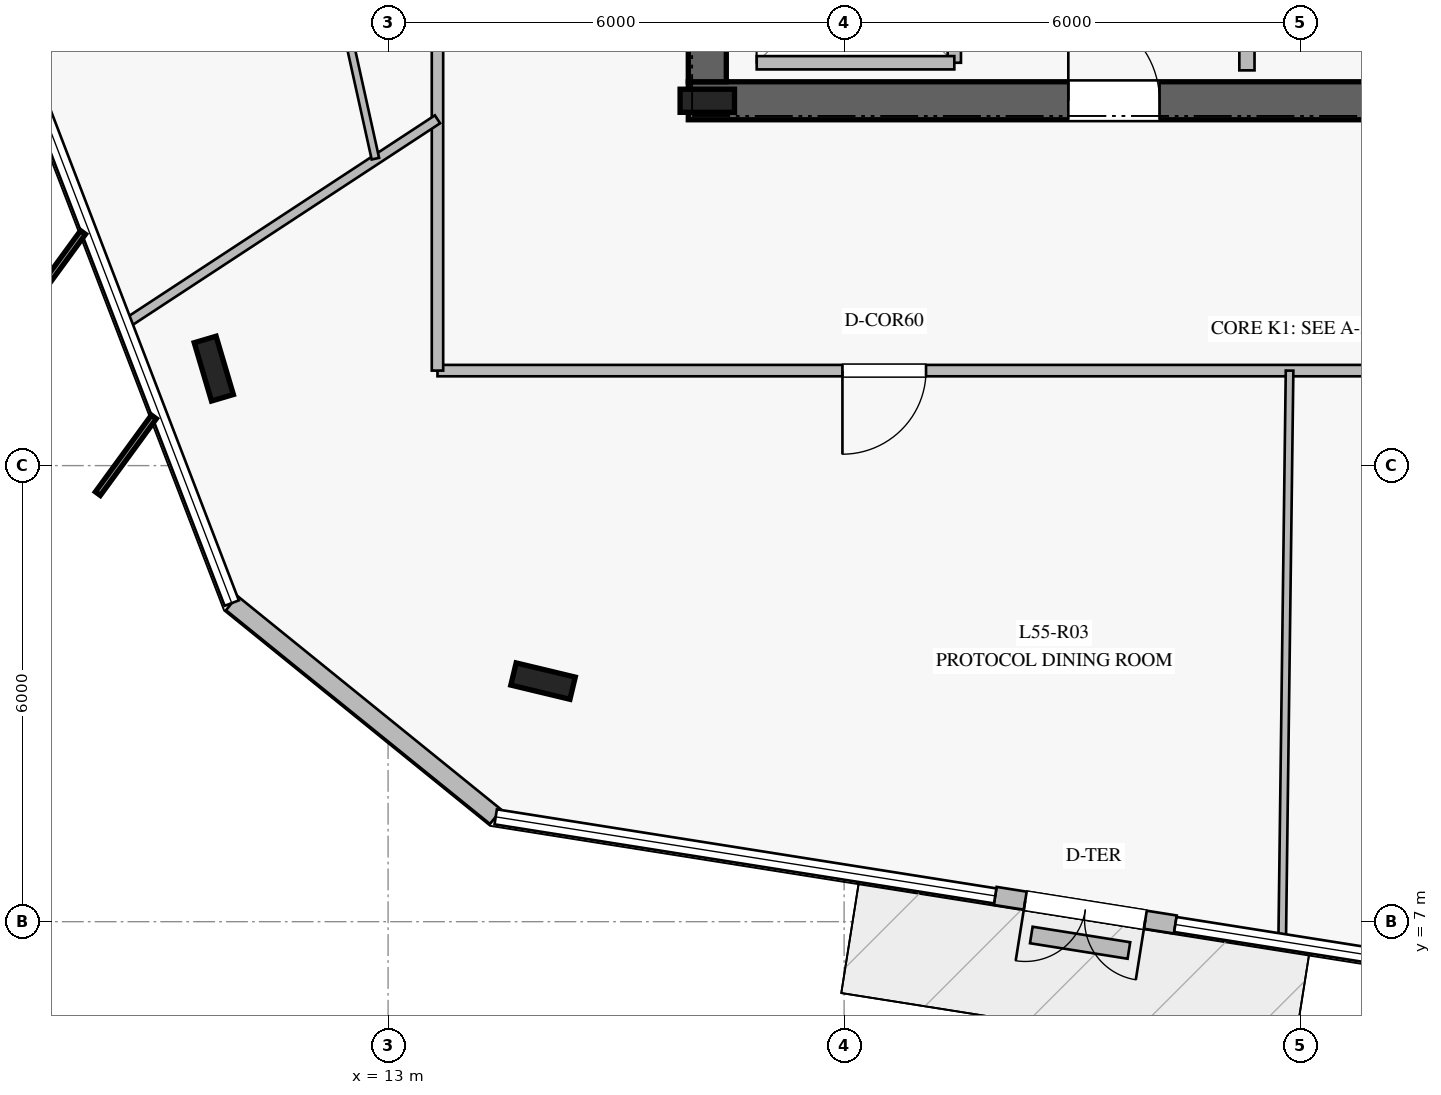
"""IFC4 building model, lengths in metres.
Left out: names, types, materials, properties, quantities, classifications, styles, units other than length and angle.
Written with IfcOpenShell. Run it as: python <this file> out.ifc"""

import sys

from ifc_helpers import new_model, si_unit, direction, frame, frame_2d, origin, origin_2d, place, context, subcontext, project, spatial, rectangle, i_section, extrude, element, fill, save


model = new_model("IFC4")
c1 = context("Model", 3, precision=1e-05, world=origin(), true_north=direction((0.0, 1.0)))
c2 = subcontext(c1, "Body", "Model", "MODEL_VIEW")
j1 = project(units=[si_unit("LENGTHUNIT", "METRE"), si_unit("PLANEANGLEUNIT", "RADIAN")], contexts=[c1])
p1 = place(None, origin())
s1 = spatial("IfcSite", under=j1, at=p1, CompositionType="ELEMENT")
p2 = place(p1, origin())
s2 = spatial("IfcBuilding", under=s1, at=p2, CompositionType="ELEMENT")
p3 = place(p2, frame((0.0, 0.0, 228.8)))
s3 = spatial("IfcBuildingStorey", under=s2, at=p3, CompositionType="ELEMENT", Elevation=228.8)
p4 = place(p3, frame((16.95, 17.8, 0.0), z_axis=(0.0, 0.0, 1.0), x_axis=(1.0, 0.0, 0.0)))
e1 = element("IfcWall", 1, at=p4, inside=s3, PredefinedType="SHEAR", context=c2, shape_type="SweptSolid", body=[
    extrude(rectangle(XDim=16.1, YDim=0.5, at=frame_2d((8.05, 0.0))), origin(), (0.0, 0.0, 1.0), 3.78),
])
p5 = place(p4, frame((5.0, 0.0, 0.0)))
e2 = element("IfcOpeningElement", 2, at=p5, cuts=e1, PredefinedType="OPENING", context=c2, shape_type="SweptSolid", body=[
    extrude(rectangle(XDim=1.2, YDim=2.25, at=frame_2d((0.6, 1.125))), frame((0.0, 0.26, 0.0), z_axis=(0.0, -1.0, 0.0), x_axis=(1.0, 0.0, 0.0)), (0.0, 0.0, 1.0), 0.52),
])
p6 = place(p4, frame((13.95, 0.0, 0.0)))
e3 = element("IfcOpeningElement", 3, at=p6, cuts=e1, PredefinedType="OPENING", context=c2, shape_type="SweptSolid", body=[
    extrude(rectangle(XDim=0.9, YDim=2.1, at=frame_2d((0.45, 1.05))), frame((0.0, 0.26, 0.0), z_axis=(0.0, -1.0, 0.0), x_axis=(1.0, 0.0, 0.0)), (0.0, 0.0, 1.0), 0.52),
])
p7 = place(p4, frame((9.2, 0.0, 0.0)))
e4 = element("IfcOpeningElement", 4, at=p7, cuts=e1, PredefinedType="OPENING", context=c2, shape_type="SweptSolid", body=[
    extrude(rectangle(XDim=1.1, YDim=2.2, at=frame_2d((0.55, 1.1))), frame((0.0, 0.26, 0.0), z_axis=(0.0, -1.0, 0.0), x_axis=(1.0, 0.0, 0.0)), (0.0, 0.0, 1.0), 0.52),
])
p8 = place(p3, frame((17.2, 31.95, 0.0), z_axis=(0.0, 0.0, 1.0), x_axis=(0.0, -1.0, 0.0)))
e5 = element("IfcWall", 5, at=p8, inside=s3, PredefinedType="SHEAR", context=c2, shape_type="SweptSolid", body=[
    extrude(rectangle(XDim=13.9, YDim=0.5, at=frame_2d((6.95, 0.0))), origin(), (0.0, 0.0, 1.0), 3.78),
])
p9 = place(p8, frame((2.1, 0.0, 0.0)))
e6 = element("IfcOpeningElement", 6, at=p9, cuts=e5, PredefinedType="OPENING", context=c2, shape_type="SweptSolid", body=[
    extrude(rectangle(XDim=1.5, YDim=2.2, at=frame_2d((0.75, 1.1))), frame((0.0, 0.26, 0.0), z_axis=(0.0, -1.0, 0.0), x_axis=(1.0, 0.0, 0.0)), (0.0, 0.0, 1.0), 0.52),
])
p10 = place(p3, frame((17.2, 17.8, 0.0), z_axis=(0.0, 0.0, 1.0), x_axis=(1.0, 0.0, 0.0)))
e7 = element("IfcColumn", 7, at=p10, inside=s3, PredefinedType="COLUMN", context=c2, shape_type="SweptSolid", body=[
    extrude(i_section(OverallWidth=0.304, OverallDepth=0.716, WebThickness=0.021, FlangeThickness=0.04, at=origin_2d()), origin(), (0.0, 0.0, 1.0), 4.0),
])
for number, where, z_axis, x_axis in (
    (8, (10.707, 14.276, 0.0), (0.0, 0.0, 1.0), (-0.284, 0.959, 0.0)),
    (9, (15.039, 10.165, 0.0), (0.0, 0.0, 1.0), (-0.972, 0.233, 0.0)),
):
    element("IfcColumn", number, at=place(p3, frame(where, z_axis=z_axis, x_axis=x_axis)), inside=s3, PredefinedType="COLUMN", context=c2, shape_type="SweptSolid", body=[
        extrude(i_section(OverallWidth=0.3, OverallDepth=0.8, WebThickness=0.018, FlangeThickness=0.033, at=origin_2d()), origin(), (0.0, 0.0, 1.0), 4.0),
    ])
p11 = place(p3, frame((10.943, 11.191, 0.0), z_axis=(0.0, 0.0, 1.0), x_axis=(0.777177433654, -0.629281524136, 0.0)))
e10 = element("IfcWall", 10, at=p11, inside=s3, PredefinedType="STANDARD", context=c2, shape_type="SweptSolid", body=[
    extrude(rectangle(XDim=4.469, YDim=0.24, at=frame_2d((2.234, 0.0))), origin(), (0.0, 0.0, 1.0), 3.78),
])
p12 = place(p3, frame((20.988, 7.339, 0.0), z_axis=(0.0, 0.0, 1.0), x_axis=(0.987632277634, -0.156788023059, 0.0)))
e11 = element("IfcWall", 11, at=p12, inside=s3, PredefinedType="STANDARD", context=c2, shape_type="SweptSolid", body=[
    extrude(rectangle(XDim=2.4, YDim=0.24, at=frame_2d((1.2, 0.0))), origin(), (0.0, 0.0, 1.0), 3.78),
])
p13 = place(p12, frame((0.4, 0.0, 0.0)))
e12 = element("IfcOpeningElement", 12, at=p13, cuts=e11, PredefinedType="OPENING", context=c2, shape_type="SweptSolid", body=[
    extrude(rectangle(XDim=1.6, YDim=2.25, at=frame_2d((0.8, 1.125))), frame((0.0, 0.13, 0.0), z_axis=(0.0, -1.0, 0.0), x_axis=(1.0, 0.0, 0.0)), (0.0, 0.0, 1.0), 0.26),
])
p14 = place(p3, frame((21.463, 6.825, 0.0), z_axis=(0.0, 0.0, 1.0), x_axis=(0.98763322112, -0.156782079779, 0.0)))
e13 = element("IfcWall", 13, at=p14, inside=s3, PredefinedType="USERDEFINED", context=c2, shape_type="SweptSolid", body=[
    extrude(rectangle(XDim=1.3, YDim=0.22, at=frame_2d((0.65, 0.0))), origin(), (0.0, 0.0, 1.0), 0.4),
])
p15 = place(p3, frame((24.3, 18.2, 0.0), z_axis=(0.0, 0.0, 1.0), x_axis=(0.0, 1.0, 0.0)))
e14 = element("IfcWall", 14, at=p15, inside=s3, PredefinedType="PARTITIONING", context=c2, shape_type="SweptSolid", body=[
    extrude(rectangle(XDim=5.15, YDim=0.2, at=frame_2d((2.575, 0.0))), origin(), (0.0, 0.0, 1.0), 3.78),
])
p16 = place(p3, frame((20.45, 18.3, 0.0), z_axis=(0.0, 0.0, 1.0), x_axis=(0.0, 1.0, 0.0)))
e15 = element("IfcWall", 15, at=p16, inside=s3, PredefinedType="PARTITIONING", context=c2, shape_type="SweptSolid", body=[
    extrude(rectangle(XDim=2.6, YDim=0.175, at=frame_2d((1.3, 0.0))), origin(), (0.0, 0.0, 1.0), 3.78),
])
p17 = place(p16, frame((0.7, 0.0, 0.0)))
e16 = element("IfcOpeningElement", 16, at=p17, cuts=e15, PredefinedType="OPENING", context=c2, shape_type="SweptSolid", body=[
    extrude(rectangle(XDim=1.2, YDim=2.2, at=frame_2d((0.6, 1.1))), frame((0.0, 0.098, 0.0), z_axis=(0.0, -1.0, 0.0), x_axis=(1.0, 0.0, 0.0)), (0.0, 0.0, 1.0), 0.195),
])
p18 = place(p3, frame((17.85, 18.3, 0.0), z_axis=(0.0, 0.0, 1.0), x_axis=(1.0, 0.0, 0.0)))
e17 = element("IfcWall", 17, at=p18, inside=s3, PredefinedType="PARTITIONING", context=c2, shape_type="SweptSolid", body=[
    extrude(rectangle(XDim=2.6, YDim=0.175, at=frame_2d((1.3, 0.0))), origin(), (0.0, 0.0, 1.0), 3.78),
])
p19 = place(p3, frame((36.35, 14.25, 0.0), z_axis=(0.0, 0.0, 1.0), x_axis=(-1.0, 0.0, 0.0)))
e18 = element("IfcWall", 18, at=p19, inside=s3, PredefinedType="PARTITIONING", context=c2, shape_type="SweptSolid", body=[
    extrude(rectangle(XDim=22.7, YDim=0.15, at=frame_2d((11.35, 0.0))), origin(), (0.0, 0.0, 1.0), 3.05),
])
p20 = place(p19, frame((16.272, 0.0, 0.0)))
e19 = element("IfcOpeningElement", 19, at=p20, cuts=e18, PredefinedType="OPENING", context=c2, shape_type="SweptSolid", body=[
    extrude(rectangle(XDim=1.1, YDim=2.2, at=frame_2d((0.55, 1.1))), frame((0.0, 0.085, 0.0), z_axis=(0.0, -1.0, 0.0), x_axis=(1.0, 0.0, 0.0)), (0.0, 0.0, 1.0), 0.17),
])
p21 = place(p3, frame((13.65, 14.25, 0.0), z_axis=(0.0, 0.0, 1.0), x_axis=(0.0, 1.0, 0.0)))
e20 = element("IfcWall", 20, at=p21, inside=s3, PredefinedType="PARTITIONING", context=c2, shape_type="SweptSolid", body=[
    extrude(rectangle(XDim=21.5, YDim=0.15, at=frame_2d((10.75, 0.0))), origin(), (0.0, 0.0, 1.0), 3.02),
])
p22 = place(p21, frame((8.036, 0.0, 0.0)))
e21 = element("IfcOpeningElement", 21, at=p22, cuts=e20, PredefinedType="OPENING", context=c2, shape_type="SweptSolid", body=[
    extrude(rectangle(XDim=1.1, YDim=2.2, at=frame_2d((0.55, 1.1))), frame((0.0, 0.085, 0.0), z_axis=(0.0, -1.0, 0.0), x_axis=(1.0, 0.0, 0.0)), (0.0, 0.0, 1.0), 0.17),
])
p23 = place(p3, frame((13.65, 17.556, 0.0), z_axis=(0.0, 0.0, 1.0), x_axis=(-0.836194204711, -0.54843345267, 0.0)))
e22 = element("IfcWall", 22, at=p23, inside=s3, PredefinedType="PARTITIONING", context=c2, shape_type="SweptSolid", body=[
    extrude(rectangle(XDim=4.903, YDim=0.125, at=frame_2d((2.452, 0.0))), origin(), (0.0, 0.0, 1.0), 3.18),
])
p24 = place(p3, frame((24.861, 14.25, 0.0), z_axis=(0.0, 0.0, 1.0), x_axis=(-0.012966880803, -0.999915926467, 0.0)))
e23 = element("IfcWall", 23, at=p24, inside=s3, PredefinedType="MOVABLE", context=c2, shape_type="SweptSolid", body=[
    extrude(rectangle(XDim=7.494, YDim=0.1, at=frame_2d((3.747, 0.0))), origin(), (0.0, 0.0, 1.0), 3.05),
])
p25 = place(p3, frame((10.162, 29.102, 0.0), z_axis=(0.0, 0.0, 1.0), x_axis=(0.216160497281, -0.976357843936, 0.0)))
e24 = element("IfcWall", 24, at=p25, inside=s3, PredefinedType="MOVABLE", context=c2, shape_type="SweptSolid", body=[
    extrude(rectangle(XDim=12.356, YDim=0.1, at=frame_2d((6.178, 0.0))), origin(), (0.0, 0.0, 1.0), 3.22),
])
p26 = place(p25, frame((5.678, 0.0, 0.0)))
e25 = element("IfcOpeningElement", 25, at=p26, cuts=e24, PredefinedType="OPENING", context=c2, shape_type="SweptSolid", body=[
    extrude(rectangle(XDim=1.0, YDim=2.15, at=frame_2d((0.5, 1.075))), frame((0.0, 0.06, 0.0), z_axis=(0.0, -1.0, 0.0), x_axis=(1.0, 0.0, 0.0)), (0.0, 0.0, 1.0), 0.12),
])
p27 = place(p13, frame((1.6, 0.0, 0.0), z_axis=(0.0, 0.0, 1.0), x_axis=(-1.0, 0.0, 0.0)))
e26 = element("IfcDoor", 26, at=p27, inside=s3, OperationType="DOUBLE_DOOR_SINGLE_SWING", PredefinedType="DOOR", context=c2, shape_type="SweptSolid", body=[
    extrude(rectangle(XDim=1.6, YDim=2.25, at=frame_2d((0.8, 1.125))), frame((0.0, 0.025, 0.0), z_axis=(0.0, -1.0, 0.0), x_axis=(1.0, 0.0, 0.0)), (0.0, 0.0, 1.0), 0.05),
])
fill(e12, e26)
p28 = place(p5, origin())
e27 = element("IfcDoor", 27, at=p28, inside=s3, OperationType="SINGLE_SWING_LEFT", PredefinedType="DOOR", context=c2, shape_type="SweptSolid", body=[
    extrude(rectangle(XDim=1.2, YDim=2.25, at=frame_2d((0.6, 1.125))), frame((0.0, 0.025, 0.0), z_axis=(0.0, -1.0, 0.0), x_axis=(1.0, 0.0, 0.0)), (0.0, 0.0, 1.0), 0.05),
])
fill(e2, e27)
p29 = place(p20, origin())
e28 = element("IfcDoor", 28, at=p29, inside=s3, OperationType="SINGLE_SWING_RIGHT", PredefinedType="DOOR", context=c2, shape_type="SweptSolid", body=[
    extrude(rectangle(XDim=1.1, YDim=2.2, at=frame_2d((0.55, 1.1))), frame((0.0, 0.025, 0.0), z_axis=(0.0, -1.0, 0.0), x_axis=(1.0, 0.0, 0.0)), (0.0, 0.0, 1.0), 0.05),
])
fill(e19, e28)
save(model, sys.argv[1])
